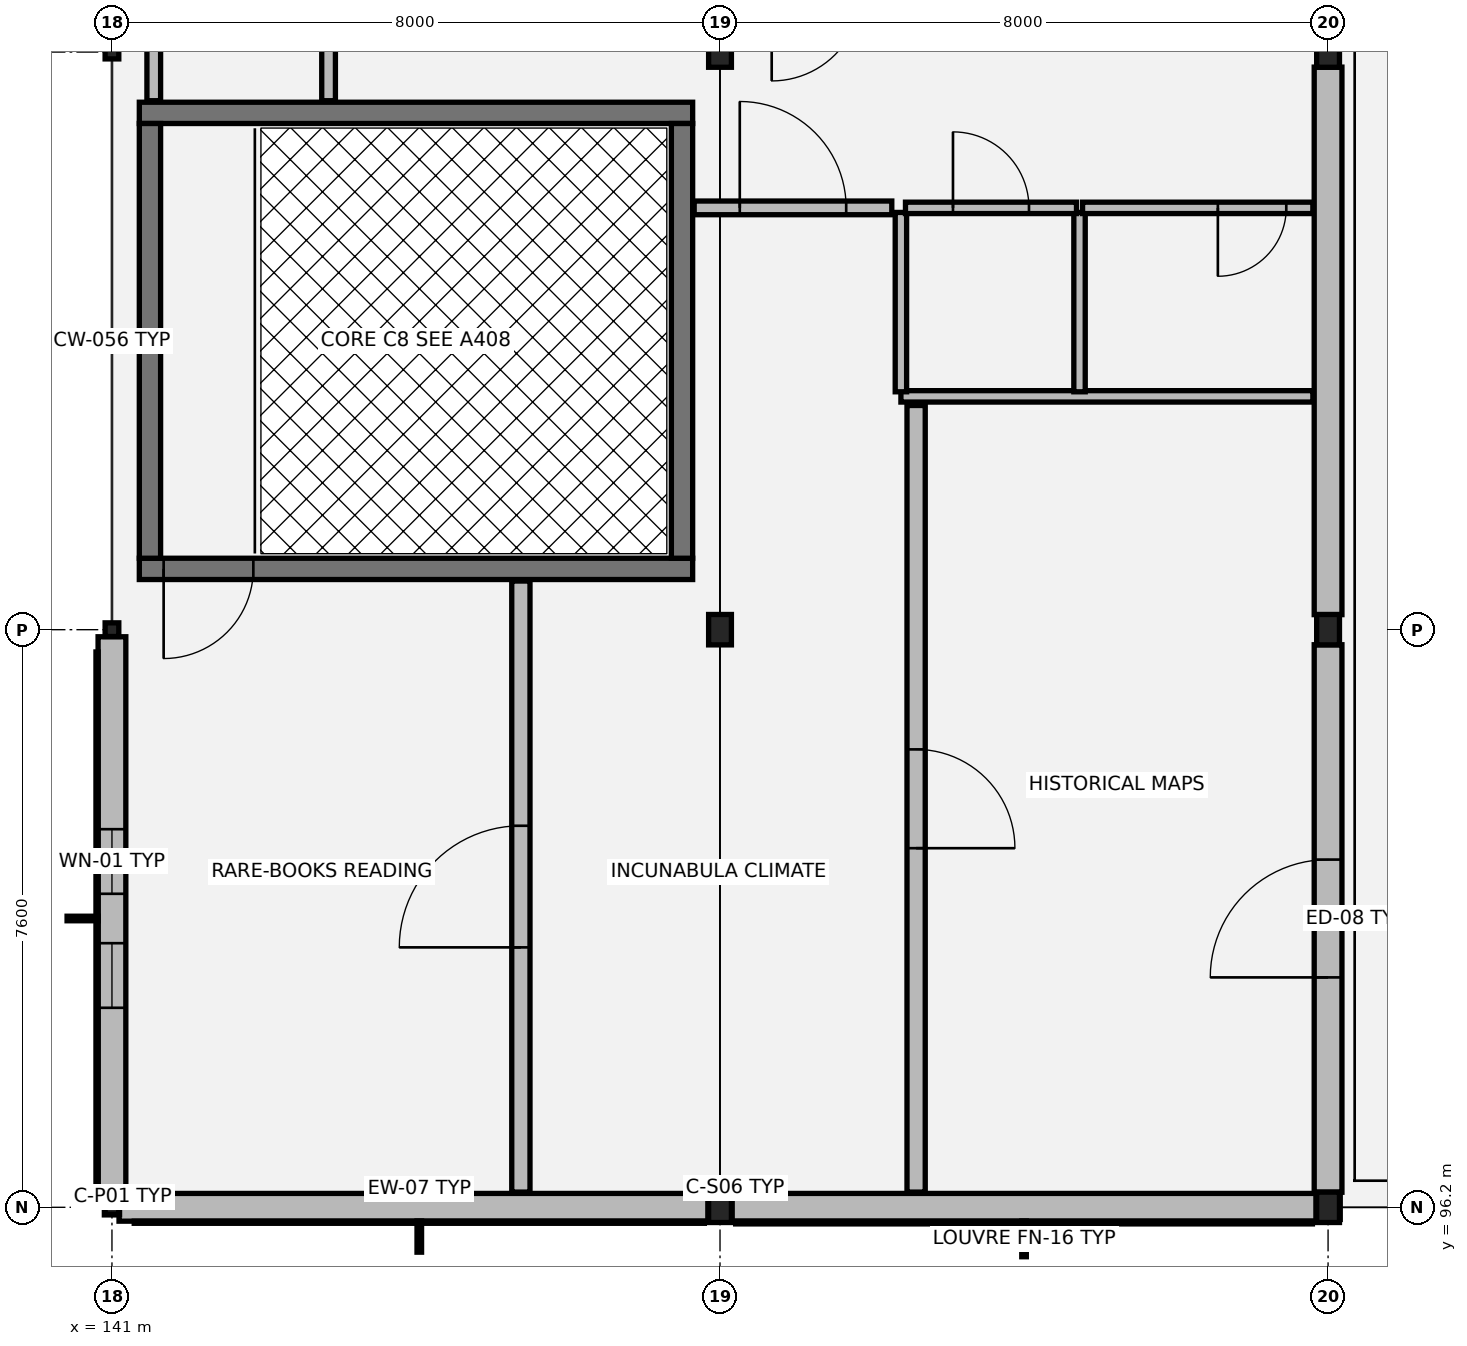
"""IFC4 building model, lengths in metres.
Left out: names, types, materials, properties, quantities, classifications, styles, units other than length and angle.
Written with IfcOpenShell. Run it as: python <this file> out.ifc"""

import sys

from ifc_helpers import new_model, si_unit, direction, frame, frame_2d, origin, origin_2d, place, context, subcontext, project, spatial, rectangle, hollow_rectangle, i_section, extrude, element, fill, save


model = new_model("IFC4")
c1 = context("Model", 3, precision=1e-05, world=origin(), true_north=direction((0.0, 1.0)))
c2 = subcontext(c1, "Body", "Model", "MODEL_VIEW")
j1 = project(units=[si_unit("LENGTHUNIT", "METRE"), si_unit("PLANEANGLEUNIT", "RADIAN")], contexts=[c1])
p1 = place(None, origin())
s1 = spatial("IfcSite", under=j1, at=p1, CompositionType="ELEMENT")
p2 = place(p1, origin())
s2 = spatial("IfcBuilding", under=s1, at=p2, CompositionType="ELEMENT")
p3 = place(p2, frame((0.0, 0.0, 17.34)))
s3 = spatial("IfcBuildingStorey", under=s2, at=p3, CompositionType="ELEMENT", Elevation=17.34)
p4 = place(p3, frame((141.0, 96.2, 0.0), z_axis=(0.0, 0.0, 1.0), x_axis=(1.0, 0.0, 0.0)))
e1 = element("IfcColumn", 1, at=p4, inside=s3, PredefinedType="COLUMN", context=c2, shape_type="SweptSolid", body=[
    extrude(hollow_rectangle(XDim=0.18, YDim=0.18, WallThickness=0.01, at=origin_2d()), origin(), (0.0, 0.0, 1.0), 3.85),
])
for number, where, z_axis, x_axis in (
    (2, (141.0, 103.8, 0.0), (0.0, 0.0, 1.0), (1.0, 0.0, 0.0)),
    (3, (141.0, 111.4, 0.0), (0.0, 0.0, 1.0), (1.0, 0.0, 0.0)),
):
    element("IfcColumn", number, at=place(p3, frame(where, z_axis=z_axis, x_axis=x_axis)), inside=s3, PredefinedType="COLUMN", context=c2, shape_type="SweptSolid", body=[
        extrude(hollow_rectangle(XDim=0.18, YDim=0.18, WallThickness=0.01, at=origin_2d()), origin(), (0.0, 0.0, 1.0), 4.055),
    ])
p5 = place(p3, frame((149.0, 96.2, 0.0), z_axis=(0.0, 0.0, 1.0), x_axis=(1.0, 0.0, 0.0)))
e4 = element("IfcColumn", 4, at=p5, inside=s3, PredefinedType="COLUMN", context=c2, shape_type="SweptSolid", body=[
    extrude(i_section(OverallWidth=0.3, OverallDepth=0.4, WebThickness=0.013, FlangeThickness=0.024, at=origin_2d()), origin(), (0.0, 0.0, 1.0), 3.85),
])
for number, where, z_axis, x_axis in (
    (5, (149.0, 103.8, 0.0), (0.0, 0.0, 1.0), (1.0, 0.0, 0.0)),
    (6, (149.0, 111.4, 0.0), (0.0, 0.0, 1.0), (1.0, 0.0, 0.0)),
):
    element("IfcColumn", number, at=place(p3, frame(where, z_axis=z_axis, x_axis=x_axis)), inside=s3, PredefinedType="COLUMN", context=c2, shape_type="SweptSolid", body=[
        extrude(i_section(OverallWidth=0.3, OverallDepth=0.4, WebThickness=0.013, FlangeThickness=0.024, at=origin_2d()), origin(), (0.0, 0.0, 1.0), 4.055),
    ])
p6 = place(p3, frame((157.0, 96.2, 0.0), z_axis=(0.0, 0.0, 1.0), x_axis=(1.0, 0.0, 0.0)))
e7 = element("IfcColumn", 7, at=p6, inside=s3, PredefinedType="COLUMN", context=c2, shape_type="SweptSolid", body=[
    extrude(i_section(OverallWidth=0.3, OverallDepth=0.4, WebThickness=0.013, FlangeThickness=0.024, at=origin_2d()), origin(), (0.0, 0.0, 1.0), 3.85),
])
for number, where, z_axis, x_axis in (
    (8, (157.0, 103.8, 0.0), (0.0, 0.0, 1.0), (1.0, 0.0, 0.0)),
    (9, (157.0, 111.4, 0.0), (0.0, 0.0, 1.0), (1.0, 0.0, 0.0)),
):
    element("IfcColumn", number, at=place(p3, frame(where, z_axis=z_axis, x_axis=x_axis)), inside=s3, PredefinedType="COLUMN", context=c2, shape_type="SweptSolid", body=[
        extrude(i_section(OverallWidth=0.3, OverallDepth=0.4, WebThickness=0.013, FlangeThickness=0.024, at=origin_2d()), origin(), (0.0, 0.0, 1.0), 4.055),
    ])
p7 = place(p3, frame((141.093, 96.2, 0.0), z_axis=(0.0, 0.0, 1.0), x_axis=(1.0, 0.0, 0.0)))
e10 = element("IfcWall", 10, at=p7, inside=s3, PredefinedType="SOLIDWALL", context=c2, shape_type="SweptSolid", body=[
    extrude(rectangle(XDim=7.901, YDim=0.365, at=frame_2d((3.95, 0.0))), origin(), (0.0, 0.0, 1.0), 3.38),
])
p8 = place(p3, frame((149.006, 96.2, 0.0), z_axis=(0.0, 0.0, 1.0), x_axis=(1.0, 0.0, 0.0)))
e11 = element("IfcWall", 11, at=p8, inside=s3, PredefinedType="SOLIDWALL", context=c2, shape_type="SweptSolid", body=[
    extrude(rectangle(XDim=7.988, YDim=0.365, at=frame_2d((3.994, 0.0))), origin(), (0.0, 0.0, 1.0), 3.38),
])
p9 = place(p3, frame((157.0, 96.398, 0.0), z_axis=(0.0, 0.0, 1.0), x_axis=(0.0, 1.0, 0.0)))
e12 = element("IfcWall", 12, at=p9, inside=s3, PredefinedType="SOLIDWALL", context=c2, shape_type="SweptSolid", body=[
    extrude(rectangle(XDim=7.204, YDim=0.365, at=frame_2d((3.602, 0.0))), origin(), (0.0, 0.0, 1.0), 3.22),
])
p10 = place(p9, frame((2.827, 0.0, 0.0)))
e13 = element("IfcOpeningElement", 13, at=p10, cuts=e12, PredefinedType="OPENING", context=c2, shape_type="SweptSolid", body=[
    extrude(rectangle(XDim=1.55, YDim=2.28, at=frame_2d((0.775, 1.14))), frame((0.0, 0.192, 0.0), z_axis=(0.0, -1.0, 0.0), x_axis=(1.0, 0.0, 0.0)), (0.0, 0.0, 1.0), 0.385),
])
p11 = place(p3, frame((157.0, 103.998, 0.0), z_axis=(0.0, 0.0, 1.0), x_axis=(0.0, 1.0, 0.0)))
e14 = element("IfcWall", 14, at=p11, inside=s3, PredefinedType="SOLIDWALL", context=c2, shape_type="SweptSolid", body=[
    extrude(rectangle(XDim=7.204, YDim=0.365, at=frame_2d((3.602, 0.0))), origin(), (0.0, 0.0, 1.0), 3.22),
])
p12 = place(p3, frame((141.0, 103.707, 0.0), z_axis=(0.0, 0.0, 1.0), x_axis=(0.0, -1.0, 0.0)))
e15 = element("IfcWall", 15, at=p12, inside=s3, PredefinedType="SOLIDWALL", context=c2, shape_type="SweptSolid", body=[
    extrude(rectangle(XDim=7.414, YDim=0.365, at=frame_2d((3.707, 0.0))), origin(), (0.0, 0.0, 1.0), 3.48),
])
p13 = place(p12, frame((2.532, 0.0, 0.8)))
e16 = element("IfcOpeningElement", 16, at=p13, cuts=e15, PredefinedType="OPENING", context=c2, shape_type="SweptSolid", body=[
    extrude(rectangle(XDim=0.85, YDim=1.95, at=frame_2d((0.425, 0.975))), frame((0.0, 0.192, 0.0), z_axis=(0.0, -1.0, 0.0), x_axis=(1.0, 0.0, 0.0)), (0.0, 0.0, 1.0), 0.385),
])
p14 = place(p12, frame((4.032, 0.0, 0.8)))
e17 = element("IfcOpeningElement", 17, at=p14, cuts=e15, PredefinedType="OPENING", context=c2, shape_type="SweptSolid", body=[
    extrude(rectangle(XDim=0.85, YDim=1.95, at=frame_2d((0.425, 0.975))), frame((0.0, 0.192, 0.0), z_axis=(0.0, -1.0, 0.0), x_axis=(1.0, 0.0, 0.0)), (0.0, 0.0, 1.0), 0.385),
])
p15 = place(p3, frame((141.36, 104.6, 0.0), z_axis=(0.0, 0.0, 1.0), x_axis=(1.0, 0.0, 0.0)))
e18 = element("IfcWall", 18, at=p15, inside=s3, PredefinedType="SHEAR", context=c2, shape_type="SweptSolid", body=[
    extrude(rectangle(XDim=7.28, YDim=0.28, at=frame_2d((3.64, 0.0))), origin(), (0.0, 0.0, 1.0), 3.845),
])
p16 = place(p15, frame((0.32, 0.0, 0.0)))
e19 = element("IfcOpeningElement", 19, at=p16, cuts=e18, PredefinedType="OPENING", context=c2, shape_type="SweptSolid", body=[
    extrude(rectangle(XDim=1.18, YDim=2.18, at=frame_2d((0.59, 1.09))), frame((0.0, 0.15, 0.0), z_axis=(0.0, -1.0, 0.0), x_axis=(1.0, 0.0, 0.0)), (0.0, 0.0, 1.0), 0.3),
])
p17 = place(p3, frame((141.36, 110.6, 0.0), z_axis=(0.0, 0.0, 1.0), x_axis=(1.0, 0.0, 0.0)))
e20 = element("IfcWall", 20, at=p17, inside=s3, PredefinedType="SHEAR", context=c2, shape_type="SweptSolid", body=[
    extrude(rectangle(XDim=7.28, YDim=0.28, at=frame_2d((3.64, 0.0))), origin(), (0.0, 0.0, 1.0), 3.845),
])
for number, where, z_axis, x_axis in (
    (21, (141.5, 104.74, 0.0), (0.0, 0.0, 1.0), (0.0, 1.0, 0.0)),
    (22, (148.5, 104.74, 0.0), (0.0, 0.0, 1.0), (0.0, 1.0, 0.0)),
):
    element("IfcWall", number, at=place(p3, frame(where, z_axis=z_axis, x_axis=x_axis)), inside=s3, PredefinedType="SHEAR", context=c2, shape_type="SweptSolid", body=[
        extrude(rectangle(XDim=5.72, YDim=0.28, at=frame_2d((2.86, 0.0))), origin(), (0.0, 0.0, 1.0), 3.845),
    ])
p18 = place(p3, frame((151.38, 106.87, 0.0), z_axis=(0.0, 0.0, 1.0), x_axis=(1.0, 0.0, 0.0)))
e23 = element("IfcWall", 23, at=p18, inside=s3, PredefinedType="PARTITIONING", context=c2, shape_type="SweptSolid", body=[
    extrude(rectangle(XDim=5.42, YDim=0.15, at=frame_2d((2.71, 0.0))), origin(), (0.0, 0.0, 1.0), 3.18),
])
for number, where, z_axis, x_axis in (
    (24, (151.38, 106.93, 0.0), (0.0, 0.0, 1.0), (0.0, 1.0, 0.0)),
    (25, (153.73, 106.93, 0.0), (0.0, 0.0, 1.0), (0.0, 1.0, 0.0)),
):
    element("IfcWall", number, at=place(p3, frame(where, z_axis=z_axis, x_axis=x_axis)), inside=s3, PredefinedType="PARTITIONING", context=c2, shape_type="SweptSolid", body=[
        extrude(rectangle(XDim=2.36, YDim=0.15, at=frame_2d((1.18, 0.0))), origin(), (0.0, 0.0, 1.0), 3.18),
    ])
p19 = place(p3, frame((151.44, 109.35, 0.0), z_axis=(0.0, 0.0, 1.0), x_axis=(1.0, 0.0, 0.0)))
e26 = element("IfcWall", 26, at=p19, inside=s3, PredefinedType="PARTITIONING", context=c2, shape_type="SweptSolid", body=[
    extrude(rectangle(XDim=2.25, YDim=0.15, at=frame_2d((1.125, 0.0))), origin(), (0.0, 0.0, 1.0), 3.18),
])
p20 = place(p19, frame((0.625, 0.0, 0.0)))
e27 = element("IfcOpeningElement", 27, at=p20, cuts=e26, PredefinedType="OPENING", context=c2, shape_type="SweptSolid", body=[
    extrude(rectangle(XDim=1.0, YDim=2.15, at=frame_2d((0.5, 1.075))), frame((0.0, 0.085, 0.0), z_axis=(0.0, -1.0, 0.0), x_axis=(1.0, 0.0, 0.0)), (0.0, 0.0, 1.0), 0.17),
])
p21 = place(p3, frame((153.77, 109.35, 0.0), z_axis=(0.0, 0.0, 1.0), x_axis=(1.0, 0.0, 0.0)))
e28 = element("IfcWall", 28, at=p21, inside=s3, PredefinedType="PARTITIONING", context=c2, shape_type="SweptSolid", body=[
    extrude(rectangle(XDim=3.03, YDim=0.15, at=frame_2d((1.515, 0.0))), origin(), (0.0, 0.0, 1.0), 3.18),
])
p22 = place(p21, frame((1.78, 0.0, 0.0)))
e29 = element("IfcOpeningElement", 29, at=p22, cuts=e28, PredefinedType="OPENING", context=c2, shape_type="SweptSolid", body=[
    extrude(rectangle(XDim=0.9, YDim=2.15, at=frame_2d((0.45, 1.075))), frame((0.0, 0.085, 0.0), z_axis=(0.0, -1.0, 0.0), x_axis=(1.0, 0.0, 0.0)), (0.0, 0.0, 1.0), 0.17),
])
p23 = place(p3, frame((148.66, 109.35, 0.0), z_axis=(0.0, 0.0, 1.0), x_axis=(1.0, 0.0, 0.0)))
e30 = element("IfcWall", 30, at=p23, inside=s3, PredefinedType="PARTITIONING", context=c2, shape_type="SweptSolid", body=[
    extrude(rectangle(XDim=2.6, YDim=0.18, at=frame_2d((1.3, 0.0))), origin(), (0.0, 0.0, 1.0), 3.18),
])
p24 = place(p23, frame((0.6, 0.0, 0.0)))
e31 = element("IfcOpeningElement", 31, at=p24, cuts=e30, PredefinedType="OPENING", context=c2, shape_type="SweptSolid", body=[
    extrude(rectangle(XDim=1.4, YDim=2.22, at=frame_2d((0.7, 1.11))), frame((0.0, 0.1, 0.0), z_axis=(0.0, -1.0, 0.0), x_axis=(1.0, 0.0, 0.0)), (0.0, 0.0, 1.0), 0.2),
])
for number, where, z_axis, x_axis in (
    (32, (141.55, 110.76, 0.0), (0.0, 0.0, 1.0), (0.0, 1.0, 0.0)),
    (33, (143.85, 110.76, 0.0), (0.0, 0.0, 1.0), (0.0, 1.0, 0.0)),
):
    element("IfcWall", number, at=place(p3, frame(where, z_axis=z_axis, x_axis=x_axis)), inside=s3, PredefinedType="PARTITIONING", context=c2, shape_type="SweptSolid", body=[
        extrude(rectangle(XDim=1.44, YDim=0.18, at=frame_2d((0.72, 0.0))), origin(), (0.0, 0.0, 1.0), 3.18),
    ])
p25 = place(p3, frame((146.38, 96.4, 0.0), z_axis=(0.0, 0.0, 1.0), x_axis=(0.0, 1.0, 0.0)))
e34 = element("IfcWall", 34, at=p25, inside=s3, PredefinedType="SOLIDWALL", context=c2, shape_type="SweptSolid", body=[
    extrude(rectangle(XDim=8.04, YDim=0.24, at=frame_2d((4.02, 0.0))), origin(), (0.0, 0.0, 1.0), 3.18),
])
p26 = place(p25, frame((3.22, 0.0, 0.0)))
e35 = element("IfcOpeningElement", 35, at=p26, cuts=e34, PredefinedType="OPENING", context=c2, shape_type="SweptSolid", body=[
    extrude(rectangle(XDim=1.6, YDim=2.25, at=frame_2d((0.8, 1.125))), frame((0.0, 0.13, 0.0), z_axis=(0.0, -1.0, 0.0), x_axis=(1.0, 0.0, 0.0)), (0.0, 0.0, 1.0), 0.26),
])
p27 = place(p3, frame((151.58, 96.4, 0.0), z_axis=(0.0, 0.0, 1.0), x_axis=(0.0, 1.0, 0.0)))
e36 = element("IfcWall", 36, at=p27, inside=s3, PredefinedType="SOLIDWALL", context=c2, shape_type="SweptSolid", body=[
    extrude(rectangle(XDim=10.35, YDim=0.24, at=frame_2d((5.175, 0.0))), origin(), (0.0, 0.0, 1.0), 3.18),
])
p28 = place(p27, frame((4.525, 0.0, 0.0)))
e37 = element("IfcOpeningElement", 37, at=p28, cuts=e36, PredefinedType="OPENING", context=c2, shape_type="SweptSolid", body=[
    extrude(rectangle(XDim=1.3, YDim=2.2, at=frame_2d((0.65, 1.1))), frame((0.0, 0.13, 0.0), z_axis=(0.0, -1.0, 0.0), x_axis=(1.0, 0.0, 0.0)), (0.0, 0.0, 1.0), 0.26),
])
p29 = place(p10, origin())
e38 = element("IfcDoor", 38, at=p29, inside=s3, OperationType="SINGLE_SWING_LEFT", PredefinedType="DOOR", context=c2, shape_type="SweptSolid", body=[
    extrude(rectangle(XDim=1.55, YDim=2.28, at=frame_2d((0.775, 1.14))), frame((0.0, 0.025, 0.0), z_axis=(0.0, -1.0, 0.0), x_axis=(1.0, 0.0, 0.0)), (0.0, 0.0, 1.0), 0.05),
])
fill(e13, e38)
p30 = place(p13, origin())
e39 = element("IfcWindow", 39, at=p30, inside=s3, PartitioningType="SINGLE_PANEL", PredefinedType="WINDOW", context=c2, shape_type="SweptSolid", body=[
    extrude(rectangle(XDim=0.85, YDim=1.95, at=frame_2d((0.425, 0.975))), frame((0.0, 0.03, 0.0), z_axis=(0.0, -1.0, 0.0), x_axis=(1.0, 0.0, 0.0)), (0.0, 0.0, 1.0), 0.06),
])
fill(e16, e39)
p31 = place(p14, origin())
e40 = element("IfcWindow", 40, at=p31, inside=s3, PartitioningType="SINGLE_PANEL", PredefinedType="WINDOW", context=c2, shape_type="SweptSolid", body=[
    extrude(rectangle(XDim=0.85, YDim=1.95, at=frame_2d((0.425, 0.975))), frame((0.0, 0.03, 0.0), z_axis=(0.0, -1.0, 0.0), x_axis=(1.0, 0.0, 0.0)), (0.0, 0.0, 1.0), 0.06),
])
fill(e17, e40)
p32 = place(p16, origin())
e41 = element("IfcDoor", 41, at=p32, inside=s3, OperationType="SINGLE_SWING_RIGHT", PredefinedType="DOOR", context=c2, shape_type="SweptSolid", body=[
    extrude(rectangle(XDim=1.18, YDim=2.18, at=frame_2d((0.59, 1.09))), frame((0.0, 0.025, 0.0), z_axis=(0.0, -1.0, 0.0), x_axis=(1.0, 0.0, 0.0)), (0.0, 0.0, 1.0), 0.05),
])
fill(e19, e41)
p33 = place(p20, origin())
e42 = element("IfcDoor", 42, at=p33, inside=s3, OperationType="SINGLE_SWING_LEFT", PredefinedType="DOOR", context=c2, shape_type="SweptSolid", body=[
    extrude(rectangle(XDim=1.0, YDim=2.15, at=frame_2d((0.5, 1.075))), frame((0.0, 0.025, 0.0), z_axis=(0.0, -1.0, 0.0), x_axis=(1.0, 0.0, 0.0)), (0.0, 0.0, 1.0), 0.05),
])
fill(e27, e42)
p34 = place(p22, origin())
e43 = element("IfcDoor", 43, at=p34, inside=s3, OperationType="SINGLE_SWING_RIGHT", PredefinedType="DOOR", context=c2, shape_type="SweptSolid", body=[
    extrude(rectangle(XDim=0.9, YDim=2.15, at=frame_2d((0.45, 1.075))), frame((0.0, 0.025, 0.0), z_axis=(0.0, -1.0, 0.0), x_axis=(1.0, 0.0, 0.0)), (0.0, 0.0, 1.0), 0.05),
])
fill(e29, e43)
p35 = place(p26, origin())
e44 = element("IfcDoor", 44, at=p35, inside=s3, OperationType="DOUBLE_DOOR_SINGLE_SWING", PredefinedType="DOOR", context=c2, shape_type="SweptSolid", body=[
    extrude(rectangle(XDim=1.6, YDim=2.25, at=frame_2d((0.8, 1.125))), frame((0.0, 0.025, 0.0), z_axis=(0.0, -1.0, 0.0), x_axis=(1.0, 0.0, 0.0)), (0.0, 0.0, 1.0), 0.05),
])
fill(e35, e44)
p36 = place(p24, origin())
e45 = element("IfcDoor", 45, at=p36, inside=s3, OperationType="SINGLE_SWING_LEFT", PredefinedType="DOOR", context=c2, shape_type="SweptSolid", body=[
    extrude(rectangle(XDim=1.4, YDim=2.22, at=frame_2d((0.7, 1.11))), frame((0.0, 0.025, 0.0), z_axis=(0.0, -1.0, 0.0), x_axis=(1.0, 0.0, 0.0)), (0.0, 0.0, 1.0), 0.05),
])
fill(e31, e45)
p37 = place(p28, origin())
e46 = element("IfcDoor", 46, at=p37, inside=s3, OperationType="SINGLE_SWING_RIGHT", PredefinedType="DOOR", context=c2, shape_type="SweptSolid", body=[
    extrude(rectangle(XDim=1.3, YDim=2.2, at=frame_2d((0.65, 1.1))), frame((0.0, 0.025, 0.0), z_axis=(0.0, -1.0, 0.0), x_axis=(1.0, 0.0, 0.0)), (0.0, 0.0, 1.0), 0.05),
])
fill(e37, e46)
save(model, sys.argv[1])
